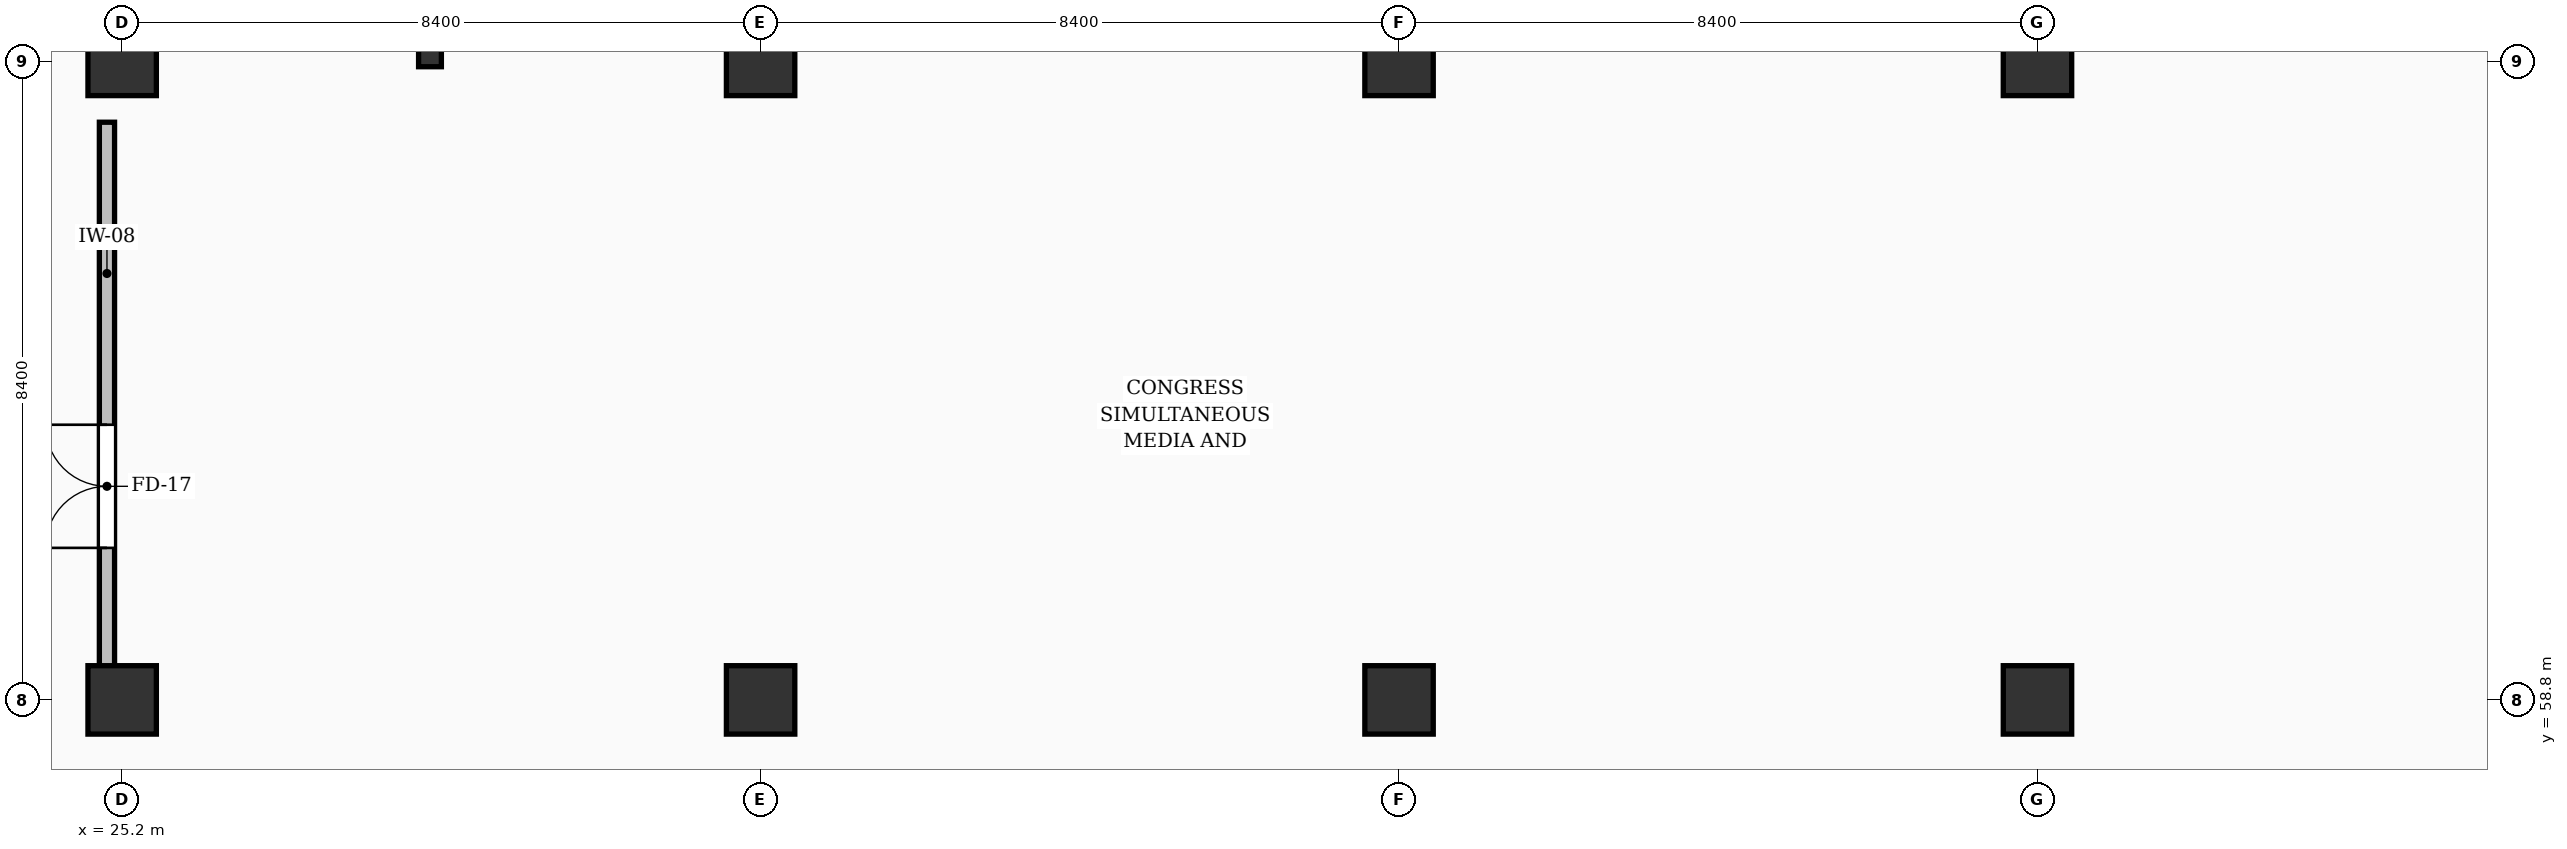
"""IFC4 building model, lengths in metres.
Left out: names, types, materials, properties, quantities, classifications, styles, units other than length and angle.
Written with IfcOpenShell. Run it as: python <this file> out.ifc"""

import sys

from ifc_helpers import new_model, si_unit, direction, frame, frame_2d, origin, origin_2d, place, context, subcontext, project, spatial, rectangle, hollow_rectangle, extrude, element, fill, save


model = new_model("IFC4")
c1 = context("Model", 3, precision=1e-05, world=origin(), true_north=direction((0.0, 1.0)))
c2 = subcontext(c1, "Body", "Model", "MODEL_VIEW")
j1 = project(units=[si_unit("LENGTHUNIT", "METRE"), si_unit("PLANEANGLEUNIT", "RADIAN")], contexts=[c1])
p1 = place(None, origin())
s1 = spatial("IfcSite", under=j1, at=p1, CompositionType="ELEMENT")
p2 = place(p1, origin())
s2 = spatial("IfcBuilding", under=s1, at=p2, CompositionType="ELEMENT")
p3 = place(p2, frame((0.0, 0.0, -7.56)))
s3 = spatial("IfcBuildingStorey", under=s2, at=p3, CompositionType="ELEMENT", Elevation=-7.56)
for number, where, z_axis, x_axis in (
    (1, (25.2, 58.8, -0.5), (0.0, 0.0, 1.0), (1.0, 0.0, 0.0)),
    (2, (25.2, 67.2, -0.5), (0.0, 0.0, 1.0), (1.0, 0.0, 0.0)),
    (3, (33.6, 58.8, -0.5), (0.0, 0.0, 1.0), (1.0, 0.0, 0.0)),
    (4, (33.6, 67.2, -0.5), (0.0, 0.0, 1.0), (1.0, 0.0, 0.0)),
    (5, (42.0, 58.8, -0.5), (0.0, 0.0, 1.0), (1.0, 0.0, 0.0)),
    (6, (42.0, 67.2, -0.5), (0.0, 0.0, 1.0), (1.0, 0.0, 0.0)),
    (7, (50.4, 58.8, -0.5), (0.0, 0.0, 1.0), (1.0, 0.0, 0.0)),
    (8, (50.4, 67.2, -0.5), (0.0, 0.0, 1.0), (1.0, 0.0, 0.0)),
):
    element("IfcColumn", number, at=place(p3, frame(where, z_axis=z_axis, x_axis=x_axis)), inside=s3, PredefinedType="COLUMN", context=c2, shape_type="SweptSolid", body=[
        extrude(rectangle(XDim=0.9, YDim=0.9, at=origin_2d()), origin(), (0.0, 0.0, 1.0), 3.86),
    ])
p4 = place(p3, frame((29.25, 67.28, -0.5), z_axis=(0.0, 0.0, 1.0), x_axis=(1.0, 0.0, 0.0)))
e9 = element("IfcColumn", 9, at=p4, inside=s3, PredefinedType="COLUMN", context=c2, shape_type="SweptSolid", body=[
    extrude(hollow_rectangle(XDim=0.3, YDim=0.3, WallThickness=0.016, at=origin_2d()), origin(), (0.0, 0.0, 1.0), 3.86),
])
p5 = place(p3, frame((25.0, 58.6, 0.0), z_axis=(0.0, 0.0, 1.0), x_axis=(0.0, 1.0, 0.0)))
e10 = element("IfcWall", 10, at=p5, inside=s3, PredefinedType="SOLIDWALL", context=c2, shape_type="SweptSolid", body=[
    extrude(rectangle(XDim=7.8, YDim=0.2, at=frame_2d((3.9, 0.0))), origin(), (0.0, 0.0, 1.0), 2.095),
])
p6 = place(p5, frame((2.2, 0.0, 0.0)))
e11 = element("IfcOpeningElement", 11, at=p6, cuts=e10, PredefinedType="OPENING", context=c2, shape_type="SweptSolid", body=[
    extrude(rectangle(XDim=1.62, YDim=2.02, at=frame_2d((0.81, 1.01))), frame((0.0, 0.11, 0.0), z_axis=(0.0, -1.0, 0.0), x_axis=(1.0, 0.0, 0.0)), (0.0, 0.0, 1.0), 0.22),
])
p7 = place(p6, origin())
e12 = element("IfcDoor", 12, at=p7, inside=s3, OperationType="DOUBLE_DOOR_SINGLE_SWING", PredefinedType="DOOR", context=c2, shape_type="SweptSolid", body=[
    extrude(rectangle(XDim=1.62, YDim=2.02, at=frame_2d((0.81, 1.01))), frame((0.0, 0.025, 0.0), z_axis=(0.0, -1.0, 0.0), x_axis=(1.0, 0.0, 0.0)), (0.0, 0.0, 1.0), 0.05),
])
fill(e11, e12)
save(model, sys.argv[1])
